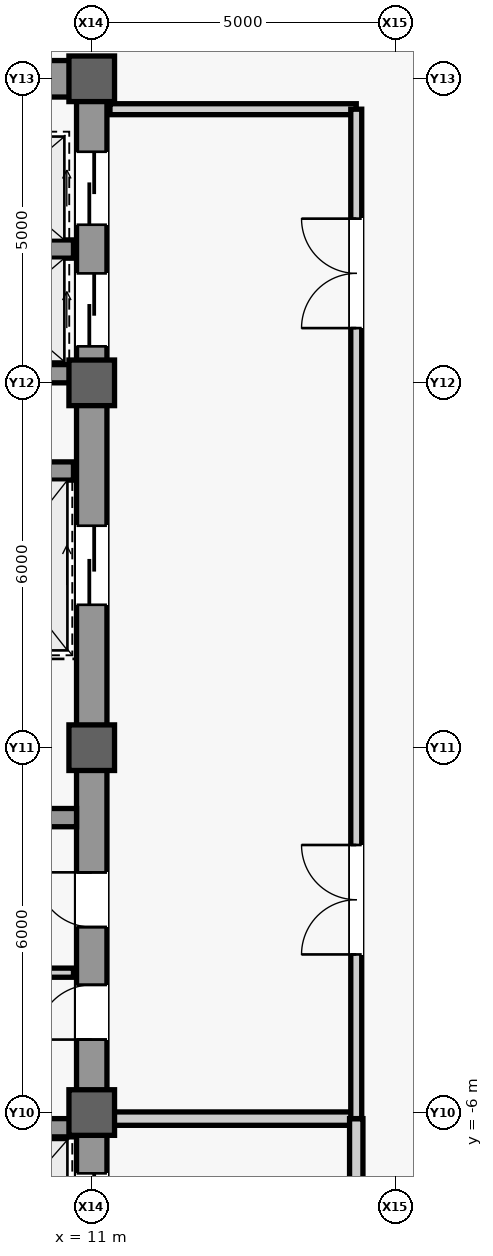
"""IFC4 building model, lengths in metres.
Left out: names, types, materials, properties, quantities, classifications, styles, units other than length and angle.
Written with IfcOpenShell. Run it as: python <this file> out.ifc"""

import sys

from ifc_helpers import new_model, si_unit, direction, frame, frame_2d, origin, origin_2d, place, context, subcontext, project, spatial, rectangle, extrude, source, transform, mapped, element, fill, save


model = new_model("IFC4")
c1 = context("Model", 3, precision=1e-05, world=origin(), true_north=direction((0.0, 1.0)))
c2 = subcontext(c1, "Body", "Model", "MODEL_VIEW")
j1 = project(units=[si_unit("LENGTHUNIT", "METRE"), si_unit("PLANEANGLEUNIT", "RADIAN")], contexts=[c1])
p1 = place(None, origin())
s1 = spatial("IfcSite", under=j1, at=p1, CompositionType="ELEMENT")
p2 = place(p1, origin())
s2 = spatial("IfcBuilding", under=s1, at=p2, CompositionType="ELEMENT")
p3 = place(p2, frame((0.0, 0.0, 301.5)))
s3 = spatial("IfcBuildingStorey", under=s2, at=p3, CompositionType="ELEMENT", Elevation=301.5)
m1 = source(origin(), c2, "Body", "SweptSolid", [
    extrude(rectangle(XDim=22.0, YDim=0.5, at=frame_2d((11.0, 0.0))), origin(), (0.0, 0.0, 1.0), 3.78),
])
p4 = place(p3, frame((11.0, -11.0, 0.0), z_axis=(0.0, 0.0, 1.0), x_axis=(0.0, 1.0, 0.0)))
e1 = element("IfcWall", 1, at=p4, inside=s3, PredefinedType="SHEAR", context=c2, shape_type="MappedRepresentation", body=[
    mapped(m1, transform((0.0, 0.0, 0.0), scale=1.0)),
])
m2 = source(origin(), c2, "Body", "SweptSolid", [
    extrude(rectangle(XDim=1.1, YDim=2.2, at=frame_2d((0.55, 1.1))), frame((0.0, 0.26, 0.0), z_axis=(0.0, -1.0, 0.0), x_axis=(1.0, 0.0, 0.0)), (0.0, 0.0, 1.0), 0.52),
])
p5 = place(p4, frame((0.8, 0.0, 0.0)))
e2 = element("IfcOpeningElement", 2, at=p5, cuts=e1, PredefinedType="OPENING", context=c2, shape_type="MappedRepresentation", body=[
    mapped(m2, transform((0.0, 0.0, 0.0), scale=1.0)),
])
m3 = source(origin(), c2, "Body", "SweptSolid", [
    extrude(rectangle(XDim=0.9, YDim=2.15, at=frame_2d((0.45, 1.075))), frame((0.0, 0.26, 0.0), z_axis=(0.0, -1.0, 0.0), x_axis=(1.0, 0.0, 0.0)), (0.0, 0.0, 1.0), 0.52),
])
p6 = place(p4, frame((6.2, 0.0, 0.0)))
e3 = element("IfcOpeningElement", 3, at=p6, cuts=e1, PredefinedType="OPENING", context=c2, shape_type="MappedRepresentation", body=[
    mapped(m3, transform((0.0, 0.0, 0.0), scale=1.0)),
])
p7 = place(p4, frame((8.05, 0.0, 0.0)))
e4 = element("IfcOpeningElement", 4, at=p7, cuts=e1, PredefinedType="OPENING", context=c2, shape_type="MappedRepresentation", body=[
    mapped(m3, transform((0.0, 0.0, 0.0), scale=1.0)),
])
m4 = source(origin(), c2, "Body", "SweptSolid", [
    extrude(rectangle(XDim=1.2, YDim=2.3, at=frame_2d((0.6, 1.15))), frame((0.0, 0.26, 0.0), z_axis=(0.0, -1.0, 0.0), x_axis=(1.0, 0.0, 0.0)), (0.0, 0.0, 1.0), 0.52),
])
p8 = place(p4, frame((17.6, 0.0, 0.0)))
e5 = element("IfcOpeningElement", 5, at=p8, cuts=e1, PredefinedType="OPENING", context=c2, shape_type="MappedRepresentation", body=[
    mapped(m4, transform((0.0, 0.0, 0.0), scale=1.0)),
])
p9 = place(p4, frame((19.6, 0.0, 0.0)))
e6 = element("IfcOpeningElement", 6, at=p9, cuts=e1, PredefinedType="OPENING", context=c2, shape_type="MappedRepresentation", body=[
    mapped(m4, transform((0.0, 0.0, 0.0), scale=1.0)),
])
m5 = source(origin(), c2, "Body", "SweptSolid", [
    extrude(rectangle(XDim=1.3, YDim=2.3, at=frame_2d((0.65, 1.15))), frame((0.0, 0.26, 0.0), z_axis=(0.0, -1.0, 0.0), x_axis=(1.0, 0.0, 0.0)), (0.0, 0.0, 1.0), 0.52),
])
p10 = place(p4, frame((2.7, 0.0, 0.0)))
e7 = element("IfcOpeningElement", 7, at=p10, cuts=e1, PredefinedType="OPENING", context=c2, shape_type="MappedRepresentation", body=[
    mapped(m5, transform((0.0, 0.0, 0.0), scale=1.0)),
])
p11 = place(p4, frame((13.35, 0.0, 0.0)))
e8 = element("IfcOpeningElement", 8, at=p11, cuts=e1, PredefinedType="OPENING", context=c2, shape_type="MappedRepresentation", body=[
    mapped(m5, transform((0.0, 0.0, 0.0), scale=1.0)),
])
m6 = source(origin(), c2, "Body", "SweptSolid", [
    extrude(rectangle(XDim=5.9, YDim=0.6, at=frame_2d((2.95, 0.0))), origin(), (0.0, 0.0, 1.0), 3.78),
])
p12 = place(p3, frame((4.85, 11.0, 0.0), z_axis=(0.0, 0.0, 1.0), x_axis=(1.0, 0.0, 0.0)))
e9 = element("IfcWall", 9, at=p12, inside=s3, PredefinedType="SHEAR", context=c2, shape_type="MappedRepresentation", body=[
    mapped(m6, transform((0.0, 0.0, 0.0), scale=1.0)),
])
m7 = source(origin(), c2, "Body", "SweptSolid", [
    extrude(rectangle(XDim=1.05, YDim=2.2, at=frame_2d((0.525, 1.1))), frame((0.0, 0.31, 0.0), z_axis=(0.0, -1.0, 0.0), x_axis=(1.0, 0.0, 0.0)), (0.0, 0.0, 1.0), 0.62),
])
p13 = place(p12, frame((1.375, 0.0, 0.0)))
e10 = element("IfcOpeningElement", 10, at=p13, cuts=e9, PredefinedType="OPENING", context=c2, shape_type="MappedRepresentation", body=[
    mapped(m7, transform((0.0, 0.0, 0.0), scale=1.0)),
])
m8 = source(origin(), c2, "Body", "SweptSolid", [
    extrude(rectangle(XDim=5.65, YDim=0.3, at=frame_2d((2.825, 0.0))), origin(), (0.0, 0.0, 1.0), 3.78),
])
p14 = place(p3, frame((5.1, -1.15, 0.0), z_axis=(0.0, 0.0, 1.0), x_axis=(1.0, 0.0, 0.0)))
e11 = element("IfcWall", 11, at=p14, inside=s3, PredefinedType="SHEAR", context=c2, shape_type="MappedRepresentation", body=[
    mapped(m8, transform((0.0, 0.0, 0.0), scale=1.0)),
])
m9 = source(origin(), c2, "Body", "SweptSolid", [
    extrude(rectangle(XDim=0.75, YDim=0.75, at=origin_2d()), origin(), (0.0, 0.0, 1.0), 4.0),
])
for number, where, z_axis, x_axis in (
    (12, (11.0, -6.0, 0.0), (0.0, 0.0, 1.0), (1.0, 0.0, 0.0)),
    (13, (11.0, 0.0, 0.0), (0.0, 0.0, 1.0), (1.0, 0.0, 0.0)),
    (14, (11.0, 6.0, 0.0), (0.0, 0.0, 1.0), (1.0, 0.0, 0.0)),
    (15, (11.0, 11.0, 0.0), (0.0, 0.0, 1.0), (1.0, 0.0, 0.0)),
):
    element("IfcColumn", number, at=place(p3, frame(where, z_axis=z_axis, x_axis=x_axis)), inside=s3, PredefinedType="COLUMN", context=c2, shape_type="MappedRepresentation", body=[
        mapped(m9, transform((0.0, 0.0, 0.0), scale=1.0)),
    ])
m10 = source(origin(), c2, "Body", "SweptSolid", [
    extrude(rectangle(XDim=2.2, YDim=0.3, at=frame_2d((1.1, 0.0))), origin(), (0.0, 0.0, 1.0), 3.78),
])
p15 = place(p3, frame((8.5, -6.25, 0.0), z_axis=(0.0, 0.0, 1.0), x_axis=(1.0, 0.0, 0.0)))
e16 = element("IfcWall", 16, at=p15, inside=s3, PredefinedType="SHEAR", context=c2, shape_type="MappedRepresentation", body=[
    mapped(m10, transform((0.0, 0.0, 0.0), scale=1.0)),
])
m11 = source(origin(), c2, "Body", "SweptSolid", [
    extrude(rectangle(XDim=2.3, YDim=0.3, at=frame_2d((1.15, 0.0))), origin(), (0.0, 0.0, 1.0), 3.78),
])
for number, where, z_axis, x_axis in (
    (17, (8.4, 4.55, 0.0), (0.0, 0.0, 1.0), (1.0, 0.0, 0.0)),
    (18, (8.4, 6.15, 0.0), (0.0, 0.0, 1.0), (1.0, 0.0, 0.0)),
    (19, (8.4, 8.2, 0.0), (0.0, 0.0, 1.0), (1.0, 0.0, 0.0)),
):
    element("IfcWall", number, at=place(p3, frame(where, z_axis=z_axis, x_axis=x_axis)), inside=s3, PredefinedType="SHEAR", context=c2, shape_type="MappedRepresentation", body=[
        mapped(m11, transform((0.0, 0.0, 0.0), scale=1.0)),
    ])
m12 = source(origin(), c2, "Body", "SweptSolid", [
    extrude(rectangle(XDim=2.05, YDim=0.15, at=frame_2d((1.025, 0.0))), origin(), (0.0, 0.0, 1.0), 3.78),
])
p16 = place(p3, frame((8.65, -3.7, 0.0), z_axis=(0.0, 0.0, 1.0), x_axis=(1.0, 0.0, 0.0)))
e20 = element("IfcWall", 20, at=p16, inside=s3, PredefinedType="PARTITIONING", context=c2, shape_type="MappedRepresentation", body=[
    mapped(m12, transform((0.0, 0.0, 0.0), scale=1.0)),
])
m13 = source(origin(), c2, "Body", "SweptSolid", [
    extrude(rectangle(XDim=4.05, YDim=0.22, at=frame_2d((2.025, 0.0))), origin(), (0.0, 0.0, 1.0), 3.085),
])
p17 = place(p3, frame((11.3, -6.1, 0.0), z_axis=(0.0, 0.0, 1.0), x_axis=(1.0, 0.0, 0.0)))
e21 = element("IfcWall", 21, at=p17, inside=s3, PredefinedType="PARTITIONING", context=c2, shape_type="MappedRepresentation", body=[
    mapped(m13, transform((0.0, 0.0, 0.0), scale=1.0)),
])
m14 = source(origin(), c2, "Body", "SweptSolid", [
    extrude(rectangle(XDim=4.4, YDim=0.22, at=frame_2d((2.2, 0.0))), origin(), (0.0, 0.0, 1.0), 3.78),
])
p18 = place(p3, frame((15.35, -10.5, 0.0), z_axis=(0.0, 0.0, 1.0), x_axis=(0.0, 1.0, 0.0)))
e22 = element("IfcWall", 22, at=p18, inside=s3, PredefinedType="PARTITIONING", context=c2, shape_type="MappedRepresentation", body=[
    mapped(m14, transform((0.0, 0.0, 0.0), scale=1.0)),
])
m15 = source(origin(), c2, "Body", "SweptSolid", [
    extrude(rectangle(XDim=1.2, YDim=2.2, at=frame_2d((0.6, 1.1))), frame((0.0, 0.12, 0.0), z_axis=(0.0, -1.0, 0.0), x_axis=(1.0, 0.0, 0.0)), (0.0, 0.0, 1.0), 0.24),
])
p19 = place(p18, frame((1.6, 0.0, 0.0)))
e23 = element("IfcOpeningElement", 23, at=p19, cuts=e22, PredefinedType="OPENING", context=c2, shape_type="MappedRepresentation", body=[
    mapped(m15, transform((0.0, 0.0, 0.0), scale=1.0)),
])
m16 = source(origin(), c2, "Body", "SweptSolid", [
    extrude(rectangle(XDim=4.05, YDim=0.18, at=frame_2d((2.025, 0.0))), origin(), (0.0, 0.0, 1.0), 3.78),
])
p20 = place(p3, frame((11.3, 10.5, 0.0), z_axis=(0.0, 0.0, 1.0), x_axis=(1.0, 0.0, 0.0)))
e24 = element("IfcWall", 24, at=p20, inside=s3, PredefinedType="PARTITIONING", context=c2, shape_type="MappedRepresentation", body=[
    mapped(m16, transform((0.0, 0.0, 0.0), scale=1.0)),
])
m17 = source(origin(), c2, "Body", "SweptSolid", [
    extrude(rectangle(XDim=16.6, YDim=0.18, at=frame_2d((8.3, 0.0))), origin(), (0.0, 0.0, 1.0), 3.78),
])
p21 = place(p3, frame((15.35, -6.1, 0.0), z_axis=(0.0, 0.0, 1.0), x_axis=(0.0, 1.0, 0.0)))
e25 = element("IfcWall", 25, at=p21, inside=s3, PredefinedType="PARTITIONING", context=c2, shape_type="MappedRepresentation", body=[
    mapped(m17, transform((0.0, 0.0, 0.0), scale=1.0)),
])
m18 = source(origin(), c2, "Body", "SweptSolid", [
    extrude(rectangle(XDim=1.8, YDim=2.25, at=frame_2d((0.9, 1.125))), frame((0.0, 0.1, 0.0), z_axis=(0.0, -1.0, 0.0), x_axis=(1.0, 0.0, 0.0)), (0.0, 0.0, 1.0), 0.2),
])
p22 = place(p21, frame((2.7, 0.0, 0.0)))
e26 = element("IfcOpeningElement", 26, at=p22, cuts=e25, PredefinedType="OPENING", context=c2, shape_type="MappedRepresentation", body=[
    mapped(m18, transform((0.0, 0.0, 0.0), scale=1.0)),
])
p23 = place(p21, frame((13.0, 0.0, 0.0)))
e27 = element("IfcOpeningElement", 27, at=p23, cuts=e25, PredefinedType="OPENING", context=c2, shape_type="MappedRepresentation", body=[
    mapped(m18, transform((0.0, 0.0, 0.0), scale=1.0)),
])
m19 = source(origin(), c2, "Body", "SweptSolid", [
    extrude(rectangle(XDim=0.9, YDim=2.15, at=frame_2d((0.45, 1.075))), frame((0.0, 0.025, 0.0), z_axis=(0.0, -1.0, 0.0), x_axis=(1.0, 0.0, 0.0)), (0.0, 0.0, 1.0), 0.05),
])
p24 = place(p6, origin())
e28 = element("IfcDoor", 28, at=p24, inside=s3, OperationType="SINGLE_SWING_LEFT", PredefinedType="DOOR", context=c2, shape_type="MappedRepresentation", body=[
    mapped(m19, transform((0.0, 0.0, 0.0), scale=1.0)),
])
fill(e3, e28)
p25 = place(p7, origin())
e29 = element("IfcDoor", 29, at=p25, inside=s3, OperationType="SINGLE_SWING_RIGHT", PredefinedType="DOOR", context=c2, shape_type="MappedRepresentation", body=[
    mapped(m19, transform((0.0, 0.0, 0.0), scale=1.0)),
])
fill(e4, e29)
m20 = source(origin(), c2, "Body", "SweptSolid", [
    extrude(rectangle(XDim=1.8, YDim=2.25, at=frame_2d((0.9, 1.125))), frame((0.0, 0.025, 0.0), z_axis=(0.0, -1.0, 0.0), x_axis=(1.0, 0.0, 0.0)), (0.0, 0.0, 1.0), 0.05),
])
p26 = place(p22, origin())
e30 = element("IfcDoor", 30, at=p26, inside=s3, OperationType="SINGLE_SWING_RIGHT", PredefinedType="DOOR", context=c2, shape_type="MappedRepresentation", body=[
    mapped(m20, transform((0.0, 0.0, 0.0), scale=1.0)),
])
fill(e26, e30)
p27 = place(p23, origin())
e31 = element("IfcDoor", 31, at=p27, inside=s3, OperationType="SINGLE_SWING_LEFT", PredefinedType="DOOR", context=c2, shape_type="MappedRepresentation", body=[
    mapped(m20, transform((0.0, 0.0, 0.0), scale=1.0)),
])
fill(e27, e31)
m21 = source(origin(), c2, "Body", "SweptSolid", [
    extrude(rectangle(XDim=1.2, YDim=2.3, at=frame_2d((0.6, 1.15))), frame((0.0, 0.025, 0.0), z_axis=(0.0, -1.0, 0.0), x_axis=(1.0, 0.0, 0.0)), (0.0, 0.0, 1.0), 0.05),
])
p28 = place(p8, origin())
e32 = element("IfcDoor", 32, at=p28, inside=s3, OperationType="SLIDING_TO_LEFT", PredefinedType="DOOR", context=c2, shape_type="MappedRepresentation", body=[
    mapped(m21, transform((0.0, 0.0, 0.0), scale=1.0)),
])
fill(e5, e32)
p29 = place(p9, origin())
e33 = element("IfcDoor", 33, at=p29, inside=s3, OperationType="SLIDING_TO_LEFT", PredefinedType="DOOR", context=c2, shape_type="MappedRepresentation", body=[
    mapped(m21, transform((0.0, 0.0, 0.0), scale=1.0)),
])
fill(e6, e33)
m22 = source(origin(), c2, "Body", "SweptSolid", [
    extrude(rectangle(XDim=1.3, YDim=2.3, at=frame_2d((0.65, 1.15))), frame((0.0, 0.025, 0.0), z_axis=(0.0, -1.0, 0.0), x_axis=(1.0, 0.0, 0.0)), (0.0, 0.0, 1.0), 0.05),
])
p30 = place(p10, origin())
e34 = element("IfcDoor", 34, at=p30, inside=s3, OperationType="SLIDING_TO_LEFT", PredefinedType="DOOR", context=c2, shape_type="MappedRepresentation", body=[
    mapped(m22, transform((0.0, 0.0, 0.0), scale=1.0)),
])
fill(e7, e34)
p31 = place(p11, origin())
e35 = element("IfcDoor", 35, at=p31, inside=s3, OperationType="SLIDING_TO_LEFT", PredefinedType="DOOR", context=c2, shape_type="MappedRepresentation", body=[
    mapped(m22, transform((0.0, 0.0, 0.0), scale=1.0)),
])
fill(e8, e35)
save(model, sys.argv[1])
